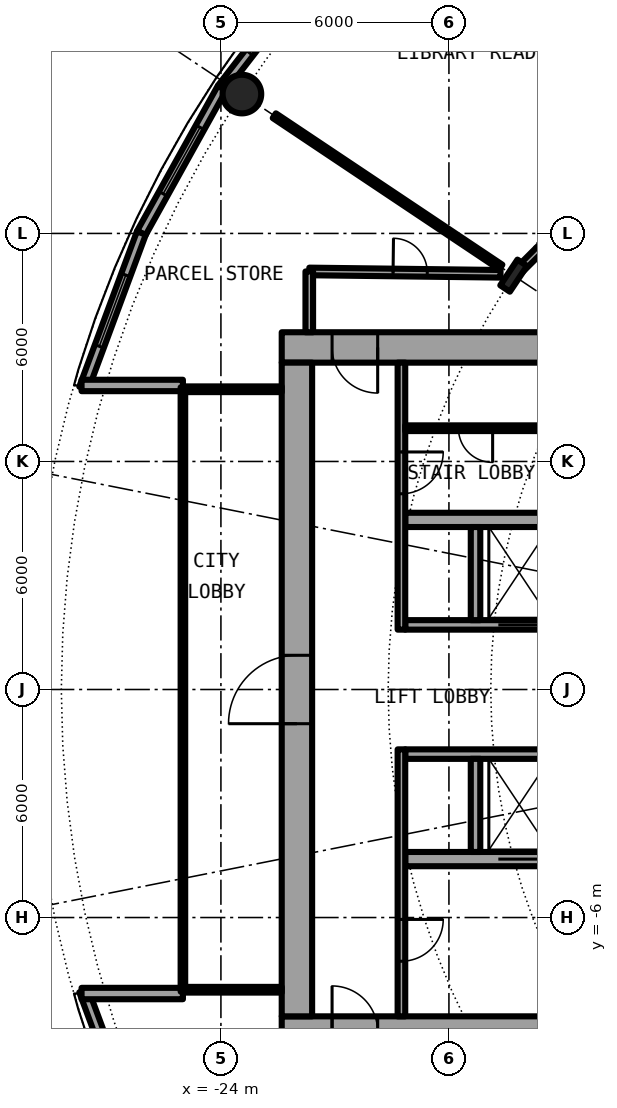
"""IFC4 building model, lengths in metres.
Left out: names, types, materials, properties, quantities, classifications, styles, units other than length and angle.
Written with IfcOpenShell. Run it as: python <this file> out.ifc"""

import sys

from ifc_helpers import new_model, si_unit, direction, frame, frame_2d, origin, origin_2d, place, context, subcontext, project, spatial, rectangle, hollow_circle, i_section, extrude, element, fill, save


model = new_model("IFC4")
c1 = context("Model", 3, precision=1e-05, world=origin(), true_north=direction((0.0, 1.0)))
c2 = subcontext(c1, "Body", "Model", "MODEL_VIEW")
j1 = project(units=[si_unit("LENGTHUNIT", "METRE"), si_unit("PLANEANGLEUNIT", "RADIAN")], contexts=[c1])
p1 = place(None, origin())
s1 = spatial("IfcSite", under=j1, at=p1, CompositionType="ELEMENT")
p2 = place(p1, origin())
s2 = spatial("IfcBuilding", under=s1, at=p2, CompositionType="ELEMENT")
p3 = place(p2, frame((0.0, 0.0, 14.1)))
s3 = spatial("IfcBuildingStorey", under=s2, at=p3, CompositionType="ELEMENT", Elevation=14.1)
p4 = place(p3, frame((-23.448, 15.667, 0.0), z_axis=(0.0, 0.0, 1.0), x_axis=(1.0, 0.0, 0.0)))
e1 = element("IfcColumn", 1, at=p4, inside=s3, PredefinedType="COLUMN", context=c2, shape_type="SweptSolid", body=[
    extrude(hollow_circle(Radius=0.508, WallThickness=0.05, at=origin_2d()), origin(), (0.0, 0.0, 1.0), 4.2),
])
p5 = place(p3, frame((-16.297, 10.889, 0.0), z_axis=(0.0, 0.0, 1.0), x_axis=(-0.831469612303, 0.55557023302, 0.0)))
e2 = element("IfcColumn", 2, at=p5, inside=s3, PredefinedType="COLUMN", context=c2, shape_type="SweptSolid", body=[
    extrude(i_section(OverallWidth=0.303, OverallDepth=0.814, WebThickness=0.021, FlangeThickness=0.04, FilletRadius=0.03, at=origin_2d()), origin(), (0.0, 0.0, 1.0), 4.2),
])
p6 = place(p3, frame((-21.304, 19.268, 0.0), z_axis=(0.0, 0.0, 1.0), x_axis=(-0.612637256412, -0.790364214812, 0.0)))
e3 = element("IfcWall", 3, at=p6, inside=s3, PredefinedType="SOLIDWALL", context=c2, shape_type="SweptSolid", body=[
    extrude(rectangle(XDim=4.36, YDim=0.25, at=frame_2d((2.18, 0.0))), origin(), (0.0, 0.0, 1.0), 3.8),
])
p7 = place(p6, frame((1.18, 0.0, 0.9)))
e4 = element("IfcOpeningElement", 4, at=p7, cuts=e3, PredefinedType="OPENING", context=c2, shape_type="SweptSolid", body=[
    extrude(rectangle(XDim=2.0, YDim=2.4, at=frame_2d((1.0, 1.2))), frame((0.0, 0.135, 0.0), z_axis=(0.0, -1.0, 0.0), x_axis=(1.0, 0.0, 0.0)), (0.0, 0.0, 1.0), 0.27),
])
p8 = place(p3, frame((-23.975, 15.822, 0.0), z_axis=(0.0, 0.0, 1.0), x_axis=(-0.485761785263, -0.8740912355, 0.0)))
e5 = element("IfcWall", 5, at=p8, inside=s3, PredefinedType="SOLIDWALL", context=c2, shape_type="SweptSolid", body=[
    extrude(rectangle(XDim=4.36, YDim=0.25, at=frame_2d((2.18, 0.0))), origin(), (0.0, 0.0, 1.0), 3.8),
])
p9 = place(p8, frame((1.18, 0.0, 0.9)))
e6 = element("IfcOpeningElement", 6, at=p9, cuts=e5, PredefinedType="OPENING", context=c2, shape_type="SweptSolid", body=[
    extrude(rectangle(XDim=2.0, YDim=2.4, at=frame_2d((1.0, 1.2))), frame((0.0, 0.135, 0.0), z_axis=(0.0, -1.0, 0.0), x_axis=(1.0, 0.0, 0.0)), (0.0, 0.0, 1.0), 0.27),
])
p10 = place(p3, frame((-26.093, 12.011, 0.0), z_axis=(0.0, 0.0, 1.0), x_axis=(-0.348003729264, -0.937493148998, 0.0)))
e7 = element("IfcWall", 7, at=p10, inside=s3, PredefinedType="SOLIDWALL", context=c2, shape_type="SweptSolid", body=[
    extrude(rectangle(XDim=4.359, YDim=0.25, at=frame_2d((2.18, 0.0))), origin(), (0.0, 0.0, 1.0), 3.8),
])
p11 = place(p10, frame((1.18, 0.0, 0.9)))
e8 = element("IfcOpeningElement", 8, at=p11, cuts=e7, PredefinedType="OPENING", context=c2, shape_type="SweptSolid", body=[
    extrude(rectangle(XDim=2.0, YDim=2.4, at=frame_2d((1.0, 1.2))), frame((0.0, 0.135, 0.0), z_axis=(0.0, -1.0, 0.0), x_axis=(1.0, 0.0, 0.0)), (0.0, 0.0, 1.0), 0.27),
])
p12 = place(p3, frame((-27.61, -7.924, 0.0), z_axis=(0.0, 0.0, 1.0), x_axis=(0.348003729264, -0.937493148998, 0.0)))
e9 = element("IfcWall", 9, at=p12, inside=s3, PredefinedType="SOLIDWALL", context=c2, shape_type="SweptSolid", body=[
    extrude(rectangle(XDim=4.359, YDim=0.25, at=frame_2d((2.18, 0.0))), origin(), (0.0, 0.0, 1.0), 3.8),
])
p13 = place(p12, frame((1.18, 0.0, 0.9)))
e10 = element("IfcOpeningElement", 10, at=p13, cuts=e9, PredefinedType="OPENING", context=c2, shape_type="SweptSolid", body=[
    extrude(rectangle(XDim=2.0, YDim=2.4, at=frame_2d((1.0, 1.2))), frame((0.0, 0.135, 0.0), z_axis=(0.0, -1.0, 0.0), x_axis=(1.0, 0.0, 0.0)), (0.0, 0.0, 1.0), 0.27),
])
for number, where, z_axis, x_axis in (
    (11, (-25.0, 8.0, 0.0), (0.0, 0.0, 1.0), (-1.0, 0.0, 0.0)),
    (12, (-25.0, -8.0, 0.0), (0.0, 0.0, 1.0), (-1.0, 0.0, 0.0)),
):
    element("IfcWall", number, at=place(p3, frame(where, z_axis=z_axis, x_axis=x_axis)), inside=s3, PredefinedType="SOLIDWALL", context=c2, shape_type="SweptSolid", body=[
        extrude(rectangle(XDim=2.667, YDim=0.3, at=frame_2d((1.333, 0.0))), origin(), (0.0, 0.0, 1.0), 3.8),
    ])
p14 = place(p3, frame((-22.4, -9.0, 0.0), z_axis=(0.0, 0.0, 1.0), x_axis=(1.0, 0.0, 0.0)))
e13 = element("IfcWall", 13, at=p14, inside=s3, PredefinedType="SHEAR", context=c2, shape_type="SweptSolid", body=[
    extrude(rectangle(XDim=14.2, YDim=0.8, at=frame_2d((7.1, 0.0))), origin(), (0.0, 0.0, 1.0), 4.2),
])
p15 = place(p14, frame((1.325, 0.0, 0.0)))
e14 = element("IfcOpeningElement", 14, at=p15, cuts=e13, PredefinedType="OPENING", context=c2, shape_type="SweptSolid", body=[
    extrude(rectangle(XDim=1.2, YDim=2.3, at=frame_2d((0.6, 1.15))), frame((0.0, 0.41, 0.0), z_axis=(0.0, -1.0, 0.0), x_axis=(1.0, 0.0, 0.0)), (0.0, 0.0, 1.0), 0.82),
])
p16 = place(p3, frame((-8.2, 9.0, 0.0), z_axis=(0.0, 0.0, 1.0), x_axis=(-1.0, 0.0, 0.0)))
e15 = element("IfcWall", 15, at=p16, inside=s3, PredefinedType="SHEAR", context=c2, shape_type="SweptSolid", body=[
    extrude(rectangle(XDim=14.2, YDim=0.8, at=frame_2d((7.1, 0.0))), origin(), (0.0, 0.0, 1.0), 4.2),
])
p17 = place(p16, frame((11.675, 0.0, 0.0)))
e16 = element("IfcOpeningElement", 16, at=p17, cuts=e15, PredefinedType="OPENING", context=c2, shape_type="SweptSolid", body=[
    extrude(rectangle(XDim=1.2, YDim=2.3, at=frame_2d((0.6, 1.15))), frame((0.0, 0.41, 0.0), z_axis=(0.0, -1.0, 0.0), x_axis=(1.0, 0.0, 0.0)), (0.0, 0.0, 1.0), 0.82),
])
p18 = place(p3, frame((-22.0, -8.6, 0.0), z_axis=(0.0, 0.0, 1.0), x_axis=(0.0, 1.0, 0.0)))
e17 = element("IfcWall", 17, at=p18, inside=s3, PredefinedType="SHEAR", context=c2, shape_type="SweptSolid", body=[
    extrude(rectangle(XDim=17.2, YDim=0.8, at=frame_2d((8.6, 0.0))), origin(), (0.0, 0.0, 1.0), 4.2),
])
p19 = place(p18, frame((7.7, 0.0, 0.0)))
e18 = element("IfcOpeningElement", 18, at=p19, cuts=e17, PredefinedType="OPENING", context=c2, shape_type="SweptSolid", body=[
    extrude(rectangle(XDim=1.8, YDim=2.3, at=frame_2d((0.9, 1.15))), frame((0.0, 0.41, 0.0), z_axis=(0.0, -1.0, 0.0), x_axis=(1.0, 0.0, 0.0)), (0.0, 0.0, 1.0), 0.82),
])
p20 = place(p3, frame((-9.0, -1.7, 0.0), z_axis=(0.0, 0.0, 1.0), x_axis=(-1.0, 0.0, 0.0)))
e19 = element("IfcWall", 19, at=p20, inside=s3, PredefinedType="SHEAR", context=c2, shape_type="SweptSolid", body=[
    extrude(rectangle(XDim=10.15, YDim=0.25, at=frame_2d((5.075, 0.0))), origin(), (0.0, 0.0, 1.0), 4.2),
])
p21 = place(p20, frame((0.387, 0.0, 0.0)))
e20 = element("IfcOpeningElement", 20, at=p21, cuts=e19, PredefinedType="OPENING", context=c2, shape_type="SweptSolid", body=[
    extrude(rectangle(XDim=1.1, YDim=2.3, at=frame_2d((0.55, 1.15))), frame((0.0, 0.135, 0.0), z_axis=(0.0, -1.0, 0.0), x_axis=(1.0, 0.0, 0.0)), (0.0, 0.0, 1.0), 0.27),
])
p22 = place(p20, frame((2.45, 0.0, 0.0)))
e21 = element("IfcOpeningElement", 21, at=p22, cuts=e19, PredefinedType="OPENING", context=c2, shape_type="SweptSolid", body=[
    extrude(rectangle(XDim=1.1, YDim=2.3, at=frame_2d((0.55, 1.15))), frame((0.0, 0.135, 0.0), z_axis=(0.0, -1.0, 0.0), x_axis=(1.0, 0.0, 0.0)), (0.0, 0.0, 1.0), 0.27),
])
p23 = place(p20, frame((4.45, 0.0, 0.0)))
e22 = element("IfcOpeningElement", 22, at=p23, cuts=e19, PredefinedType="OPENING", context=c2, shape_type="SweptSolid", body=[
    extrude(rectangle(XDim=1.1, YDim=2.3, at=frame_2d((0.55, 1.15))), frame((0.0, 0.135, 0.0), z_axis=(0.0, -1.0, 0.0), x_axis=(1.0, 0.0, 0.0)), (0.0, 0.0, 1.0), 0.27),
])
p24 = place(p3, frame((-9.0, -4.462, 0.0), z_axis=(0.0, 0.0, 1.0), x_axis=(-1.0, 0.0, 0.0)))
e23 = element("IfcWall", 23, at=p24, inside=s3, PredefinedType="SHEAR", context=c2, shape_type="SweptSolid", body=[
    extrude(rectangle(XDim=10.15, YDim=0.375, at=frame_2d((5.075, 0.0))), origin(), (0.0, 0.0, 1.0), 4.2),
])
p25 = place(p24, frame((6.6, 0.0, 0.0)))
e24 = element("IfcOpeningElement", 24, at=p25, cuts=e23, PredefinedType="OPENING", context=c2, shape_type="SweptSolid", body=[
    extrude(rectangle(XDim=1.1, YDim=2.3, at=frame_2d((0.55, 1.15))), frame((0.0, 0.198, 0.0), z_axis=(0.0, -1.0, 0.0), x_axis=(1.0, 0.0, 0.0)), (0.0, 0.0, 1.0), 0.395),
])
p26 = place(p3, frame((-17.3, -1.825, 0.0), z_axis=(0.0, 0.0, 1.0), x_axis=(0.0, -1.0, 0.0)))
e25 = element("IfcWall", 25, at=p26, inside=s3, PredefinedType="SOLIDWALL", context=c2, shape_type="SweptSolid", body=[
    extrude(rectangle(XDim=2.45, YDim=0.25, at=frame_2d((1.225, 0.0))), origin(), (0.0, 0.0, 1.0), 3.8),
])
p27 = place(p3, frame((-19.25, -1.575, 0.0), z_axis=(0.0, 0.0, 1.0), x_axis=(0.0, -1.0, 0.0)))
e26 = element("IfcWall", 26, at=p27, inside=s3, PredefinedType="SOLIDWALL", context=c2, shape_type="SweptSolid", body=[
    extrude(rectangle(XDim=7.025, YDim=0.2, at=frame_2d((3.513, 0.0))), origin(), (0.0, 0.0, 1.0), 3.8),
])
p28 = place(p27, frame((4.475, 0.0, 0.0)))
e27 = element("IfcOpeningElement", 27, at=p28, cuts=e26, PredefinedType="OPENING", context=c2, shape_type="SweptSolid", body=[
    extrude(rectangle(XDim=1.1, YDim=2.3, at=frame_2d((0.55, 1.15))), frame((0.0, 0.11, 0.0), z_axis=(0.0, -1.0, 0.0), x_axis=(1.0, 0.0, 0.0)), (0.0, 0.0, 1.0), 0.22),
])
p29 = place(p3, frame((-19.15, 1.7, 0.0), z_axis=(0.0, 0.0, 1.0), x_axis=(1.0, 0.0, 0.0)))
e28 = element("IfcWall", 28, at=p29, inside=s3, PredefinedType="SHEAR", context=c2, shape_type="SweptSolid", body=[
    extrude(rectangle(XDim=10.15, YDim=0.25, at=frame_2d((5.075, 0.0))), origin(), (0.0, 0.0, 1.0), 4.2),
])
p30 = place(p29, frame((2.45, 0.0, 0.0)))
e29 = element("IfcOpeningElement", 29, at=p30, cuts=e28, PredefinedType="OPENING", context=c2, shape_type="SweptSolid", body=[
    extrude(rectangle(XDim=1.1, YDim=2.3, at=frame_2d((0.55, 1.15))), frame((0.0, 0.135, 0.0), z_axis=(0.0, -1.0, 0.0), x_axis=(1.0, 0.0, 0.0)), (0.0, 0.0, 1.0), 0.27),
])
p31 = place(p29, frame((7.637, 0.0, 0.0)))
e30 = element("IfcOpeningElement", 30, at=p31, cuts=e28, PredefinedType="OPENING", context=c2, shape_type="SweptSolid", body=[
    extrude(rectangle(XDim=0.9, YDim=2.3, at=frame_2d((0.45, 1.15))), frame((0.0, 0.135, 0.0), z_axis=(0.0, -1.0, 0.0), x_axis=(1.0, 0.0, 0.0)), (0.0, 0.0, 1.0), 0.27),
])
p32 = place(p29, frame((4.625, 0.0, 0.0)))
e31 = element("IfcOpeningElement", 31, at=p32, cuts=e28, PredefinedType="OPENING", context=c2, shape_type="SweptSolid", body=[
    extrude(rectangle(XDim=0.9, YDim=2.3, at=frame_2d((0.45, 1.15))), frame((0.0, 0.135, 0.0), z_axis=(0.0, -1.0, 0.0), x_axis=(1.0, 0.0, 0.0)), (0.0, 0.0, 1.0), 0.27),
])
p33 = place(p3, frame((-9.0, 4.462, 0.0), z_axis=(0.0, 0.0, 1.0), x_axis=(-1.0, 0.0, 0.0)))
e32 = element("IfcWall", 32, at=p33, inside=s3, PredefinedType="SHEAR", context=c2, shape_type="SweptSolid", body=[
    extrude(rectangle(XDim=10.15, YDim=0.375, at=frame_2d((5.075, 0.0))), origin(), (0.0, 0.0, 1.0), 4.2),
])
p34 = place(p3, frame((-17.3, 1.825, 0.0), z_axis=(0.0, 0.0, 1.0), x_axis=(0.0, 1.0, 0.0)))
e33 = element("IfcWall", 33, at=p34, inside=s3, PredefinedType="SOLIDWALL", context=c2, shape_type="SweptSolid", body=[
    extrude(rectangle(XDim=2.45, YDim=0.25, at=frame_2d((1.225, 0.0))), origin(), (0.0, 0.0, 1.0), 3.8),
])
p35 = place(p3, frame((-19.25, 8.6, 0.0), z_axis=(0.0, 0.0, 1.0), x_axis=(0.0, -1.0, 0.0)))
e34 = element("IfcWall", 34, at=p35, inside=s3, PredefinedType="SOLIDWALL", context=c2, shape_type="SweptSolid", body=[
    extrude(rectangle(XDim=7.025, YDim=0.2, at=frame_2d((3.513, 0.0))), origin(), (0.0, 0.0, 1.0), 3.8),
])
p36 = place(p35, frame((2.35, 0.0, 0.0)))
e35 = element("IfcOpeningElement", 35, at=p36, cuts=e34, PredefinedType="OPENING", context=c2, shape_type="SweptSolid", body=[
    extrude(rectangle(XDim=1.1, YDim=2.3, at=frame_2d((0.55, 1.15))), frame((0.0, 0.11, 0.0), z_axis=(0.0, -1.0, 0.0), x_axis=(1.0, 0.0, 0.0)), (0.0, 0.0, 1.0), 0.22),
])
p37 = place(p3, frame((-15.45, 6.875, 0.0), z_axis=(0.0, 0.0, 1.0), x_axis=(-1.0, 0.0, 0.0)))
e36 = element("IfcWall", 36, at=p37, inside=s3, PredefinedType="PARTITIONING", context=c2, shape_type="SweptSolid", body=[
    extrude(rectangle(XDim=3.7, YDim=0.15, at=frame_2d((1.85, 0.0))), origin(), (0.0, 0.0, 1.0), 3.8),
])
p38 = place(p37, frame((1.4, 0.0, 0.0)))
e37 = element("IfcOpeningElement", 37, at=p38, cuts=e36, PredefinedType="OPENING", context=c2, shape_type="SweptSolid", body=[
    extrude(rectangle(XDim=0.9, YDim=2.3, at=frame_2d((0.45, 1.15))), frame((0.0, 0.085, 0.0), z_axis=(0.0, -1.0, 0.0), x_axis=(1.0, 0.0, 0.0)), (0.0, 0.0, 1.0), 0.17),
])
for number, where, z_axis, x_axis in (
    (38, (-22.4, 7.9, 0.0), (0.0, 0.0, 1.0), (-1.0, 0.0, 0.0)),
    (39, (-22.4, -7.9, 0.0), (0.0, 0.0, 1.0), (-1.0, 0.0, 0.0)),
):
    element("IfcWall", number, at=place(p3, frame(where, z_axis=z_axis, x_axis=x_axis)), inside=s3, PredefinedType="PARTITIONING", context=c2, shape_type="SweptSolid", body=[
        extrude(rectangle(XDim=2.54, YDim=0.15, at=frame_2d((1.27, 0.0))), origin(), (0.0, 0.0, 1.0), 3.8),
    ])
p39 = place(p3, frame((-25.0, 7.95, 0.0), z_axis=(0.0, 0.0, 1.0), x_axis=(0.0, -1.0, 0.0)))
e40 = element("IfcWall", 40, at=p39, inside=s3, PredefinedType="PARTITIONING", context=c2, shape_type="SweptSolid", body=[
    extrude(rectangle(XDim=15.9, YDim=0.12, at=frame_2d((7.95, 0.0))), origin(), (0.0, 0.0, 1.0), 3.8),
])
p40 = place(p39, frame((0.95, 0.0, 0.1)))
e41 = element("IfcOpeningElement", 41, at=p40, cuts=e40, PredefinedType="OPENING", context=c2, shape_type="SweptSolid", body=[
    extrude(rectangle(XDim=14.0, YDim=3.45, at=frame_2d((7.0, 1.725))), frame((0.0, 0.07, 0.0), z_axis=(0.0, -1.0, 0.0), x_axis=(1.0, 0.0, 0.0)), (0.0, 0.0, 1.0), 0.14),
])
p41 = place(p3, frame((-22.595, 15.098, 0.0), z_axis=(0.0, 0.0, 1.0), x_axis=(0.831431488123, -0.555627285648, 0.0)))
e42 = element("IfcWall", 42, at=p41, inside=s3, PredefinedType="PARTITIONING", context=c2, shape_type="SweptSolid", body=[
    extrude(rectangle(XDim=7.168, YDim=0.15, at=frame_2d((3.584, 0.0))), origin(), (0.0, 0.0, 1.0), 3.8),
])
p42 = place(p3, frame((-21.675, 11.0, 0.0), z_axis=(0.0, 0.0, 1.0), x_axis=(0.999924074118, -0.012322580895, 0.0)))
e43 = element("IfcWall", 43, at=p42, inside=s3, PredefinedType="PARTITIONING", context=c2, shape_type="SweptSolid", body=[
    extrude(rectangle(XDim=5.032, YDim=0.2, at=frame_2d((2.516, 0.0))), origin(), (0.0, 0.0, 1.0), 3.8),
])
p43 = place(p42, frame((2.205, 0.0, 0.0)))
e44 = element("IfcOpeningElement", 44, at=p43, cuts=e43, PredefinedType="OPENING", context=c2, shape_type="SweptSolid", body=[
    extrude(rectangle(XDim=0.9, YDim=2.3, at=frame_2d((0.45, 1.15))), frame((0.0, 0.11, 0.0), z_axis=(0.0, -1.0, 0.0), x_axis=(1.0, 0.0, 0.0)), (0.0, 0.0, 1.0), 0.22),
])
p44 = place(p3, frame((-16.188, 10.998, 0.0), z_axis=(0.0, 0.0, 1.0), x_axis=(0.707106781187, 0.707106781187, 0.0)))
e45 = element("IfcWall", 45, at=p44, inside=s3, PredefinedType="PARTITIONING", context=c2, shape_type="SweptSolid", body=[
    extrude(rectangle(XDim=7.34, YDim=0.2, at=frame_2d((3.67, 0.0))), origin(), (0.0, 0.0, 1.0), 3.38),
])
p45 = place(p44, frame((3.17, 0.0, 0.0)))
e46 = element("IfcOpeningElement", 46, at=p45, cuts=e45, PredefinedType="OPENING", context=c2, shape_type="SweptSolid", body=[
    extrude(rectangle(XDim=1.0, YDim=2.3, at=frame_2d((0.5, 1.15))), frame((0.0, 0.11, 0.0), z_axis=(0.0, -1.0, 0.0), x_axis=(1.0, 0.0, 0.0)), (0.0, 0.0, 1.0), 0.22),
])
p46 = place(p3, frame((-21.675, 9.4, 0.0), z_axis=(0.0, 0.0, 1.0), x_axis=(0.0, 1.0, 0.0)))
e47 = element("IfcWall", 47, at=p46, inside=s3, PredefinedType="PARTITIONING", context=c2, shape_type="SweptSolid", body=[
    extrude(rectangle(XDim=1.6, YDim=0.2, at=frame_2d((0.8, 0.0))), origin(), (0.0, 0.0, 1.0), 3.8),
])
p47 = place(p7, origin())
e48 = element("IfcWindow", 48, at=p47, inside=s3, PartitioningType="SINGLE_PANEL", PredefinedType="WINDOW", context=c2, shape_type="SweptSolid", body=[
    extrude(rectangle(XDim=2.0, YDim=2.4, at=frame_2d((1.0, 1.2))), frame((0.0, 0.03, 0.0), z_axis=(0.0, -1.0, 0.0), x_axis=(1.0, 0.0, 0.0)), (0.0, 0.0, 1.0), 0.06),
])
fill(e4, e48)
p48 = place(p9, origin())
e49 = element("IfcWindow", 49, at=p48, inside=s3, PartitioningType="SINGLE_PANEL", PredefinedType="WINDOW", context=c2, shape_type="SweptSolid", body=[
    extrude(rectangle(XDim=2.0, YDim=2.4, at=frame_2d((1.0, 1.2))), frame((0.0, 0.03, 0.0), z_axis=(0.0, -1.0, 0.0), x_axis=(1.0, 0.0, 0.0)), (0.0, 0.0, 1.0), 0.06),
])
fill(e6, e49)
p49 = place(p11, origin())
e50 = element("IfcWindow", 50, at=p49, inside=s3, PartitioningType="SINGLE_PANEL", PredefinedType="WINDOW", context=c2, shape_type="SweptSolid", body=[
    extrude(rectangle(XDim=2.0, YDim=2.4, at=frame_2d((1.0, 1.2))), frame((0.0, 0.03, 0.0), z_axis=(0.0, -1.0, 0.0), x_axis=(1.0, 0.0, 0.0)), (0.0, 0.0, 1.0), 0.06),
])
fill(e8, e50)
p50 = place(p25, origin())
e51 = element("IfcDoor", 51, at=p50, inside=s3, OperationType="DOUBLE_DOOR_SLIDING", PredefinedType="DOOR", context=c2, shape_type="SweptSolid", body=[
    extrude(rectangle(XDim=1.1, YDim=2.3, at=frame_2d((0.55, 1.15))), frame((0.0, 0.025, 0.0), z_axis=(0.0, -1.0, 0.0), x_axis=(1.0, 0.0, 0.0)), (0.0, 0.0, 1.0), 0.05),
])
fill(e24, e51)
p51 = place(p30, origin())
e52 = element("IfcDoor", 52, at=p51, inside=s3, OperationType="DOUBLE_DOOR_SLIDING", PredefinedType="DOOR", context=c2, shape_type="SweptSolid", body=[
    extrude(rectangle(XDim=1.1, YDim=2.3, at=frame_2d((0.55, 1.15))), frame((0.0, 0.025, 0.0), z_axis=(0.0, -1.0, 0.0), x_axis=(1.0, 0.0, 0.0)), (0.0, 0.0, 1.0), 0.05),
])
fill(e29, e52)
p52 = place(p38, origin())
e53 = element("IfcDoor", 53, at=p52, inside=s3, OperationType="SINGLE_SWING_LEFT", PredefinedType="DOOR", context=c2, shape_type="SweptSolid", body=[
    extrude(rectangle(XDim=0.9, YDim=2.3, at=frame_2d((0.45, 1.15))), frame((0.0, 0.025, 0.0), z_axis=(0.0, -1.0, 0.0), x_axis=(1.0, 0.0, 0.0)), (0.0, 0.0, 1.0), 0.05),
])
fill(e37, e53)
p53 = place(p28, origin())
e54 = element("IfcDoor", 54, at=p53, inside=s3, OperationType="SINGLE_SWING_LEFT", PredefinedType="DOOR", context=c2, shape_type="SweptSolid", body=[
    extrude(rectangle(XDim=1.1, YDim=2.3, at=frame_2d((0.55, 1.15))), frame((0.0, 0.025, 0.0), z_axis=(0.0, -1.0, 0.0), x_axis=(1.0, 0.0, 0.0)), (0.0, 0.0, 1.0), 0.05),
])
fill(e27, e54)
p54 = place(p36, origin())
e55 = element("IfcDoor", 55, at=p54, inside=s3, OperationType="SINGLE_SWING_RIGHT", PredefinedType="DOOR", context=c2, shape_type="SweptSolid", body=[
    extrude(rectangle(XDim=1.1, YDim=2.3, at=frame_2d((0.55, 1.15))), frame((0.0, 0.025, 0.0), z_axis=(0.0, -1.0, 0.0), x_axis=(1.0, 0.0, 0.0)), (0.0, 0.0, 1.0), 0.05),
])
fill(e35, e55)
p55 = place(p17, origin())
e56 = element("IfcDoor", 56, at=p55, inside=s3, OperationType="SINGLE_SWING_LEFT", PredefinedType="DOOR", context=c2, shape_type="SweptSolid", body=[
    extrude(rectangle(XDim=1.2, YDim=2.3, at=frame_2d((0.6, 1.15))), frame((0.0, 0.025, 0.0), z_axis=(0.0, -1.0, 0.0), x_axis=(1.0, 0.0, 0.0)), (0.0, 0.0, 1.0), 0.05),
])
fill(e16, e56)
p56 = place(p19, origin())
e57 = element("IfcDoor", 57, at=p56, inside=s3, OperationType="SINGLE_SWING_LEFT", PredefinedType="DOOR", context=c2, shape_type="SweptSolid", body=[
    extrude(rectangle(XDim=1.8, YDim=2.3, at=frame_2d((0.9, 1.15))), frame((0.0, 0.025, 0.0), z_axis=(0.0, -1.0, 0.0), x_axis=(1.0, 0.0, 0.0)), (0.0, 0.0, 1.0), 0.05),
])
fill(e18, e57)
p57 = place(p40, origin())
e58 = element("IfcWindow", 58, at=p57, inside=s3, PartitioningType="SINGLE_PANEL", PredefinedType="WINDOW", context=c2, shape_type="SweptSolid", body=[
    extrude(rectangle(XDim=14.0, YDim=3.45, at=frame_2d((7.0, 1.725))), frame((0.0, 0.03, 0.0), z_axis=(0.0, -1.0, 0.0), x_axis=(1.0, 0.0, 0.0)), (0.0, 0.0, 1.0), 0.06),
])
fill(e41, e58)
p58 = place(p43, origin())
e59 = element("IfcDoor", 59, at=p58, inside=s3, OperationType="SINGLE_SWING_RIGHT", PredefinedType="DOOR", context=c2, shape_type="SweptSolid", body=[
    extrude(rectangle(XDim=0.9, YDim=2.3, at=frame_2d((0.45, 1.15))), frame((0.0, 0.025, 0.0), z_axis=(0.0, -1.0, 0.0), x_axis=(1.0, 0.0, 0.0)), (0.0, 0.0, 1.0), 0.05),
])
fill(e44, e59)
save(model, sys.argv[1])
